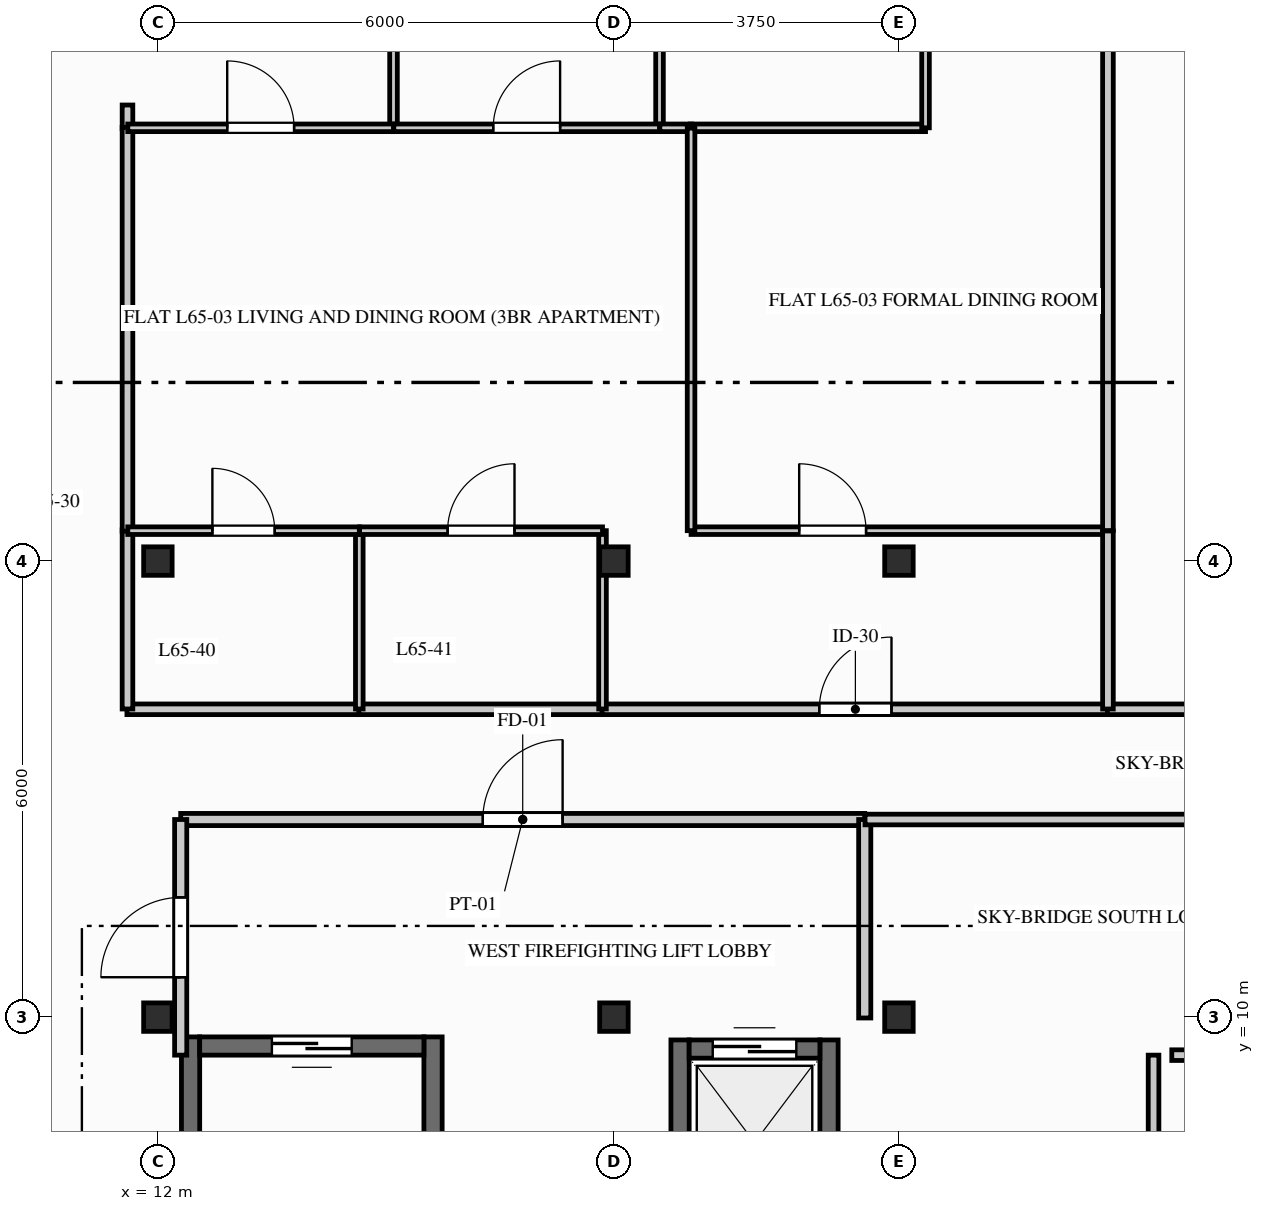
"""IFC4 building model, lengths in metres.
Left out: names, types, materials, properties, quantities, classifications, styles, units other than length and angle.
Written with IfcOpenShell. Run it as: python <this file> out.ifc"""

import sys

from ifc_helpers import new_model, si_unit, direction, frame, frame_2d, origin, origin_2d, place, context, subcontext, project, spatial, rectangle, i_section, extrude, element, fill, save


model = new_model("IFC4")
c1 = context("Model", 3, precision=1e-05, world=origin(), true_north=direction((0.0, 1.0)))
c2 = subcontext(c1, "Body", "Model", "MODEL_VIEW")
j1 = project(units=[si_unit("LENGTHUNIT", "METRE"), si_unit("PLANEANGLEUNIT", "RADIAN")], contexts=[c1])
p1 = place(None, origin())
s1 = spatial("IfcSite", under=j1, at=p1, CompositionType="ELEMENT")
p2 = place(p1, origin())
s2 = spatial("IfcBuilding", under=s1, at=p2, CompositionType="ELEMENT")
p3 = place(p2, frame((0.0, 0.0, 214.4)))
s3 = spatial("IfcBuildingStorey", under=s2, at=p3, CompositionType="ELEMENT", Elevation=214.4)
for number, where, z_axis, x_axis in (
    (1, (12.0, 10.0, 0.0), (0.0, 0.0, 1.0), (1.0, 0.0, 0.0)),
    (2, (12.0, 16.0, 0.0), (0.0, 0.0, 1.0), (1.0, 0.0, 0.0)),
    (3, (18.0, 10.0, 0.0), (0.0, 0.0, 1.0), (1.0, 0.0, 0.0)),
    (4, (18.0, 16.0, 0.0), (0.0, 0.0, 1.0), (1.0, 0.0, 0.0)),
    (5, (21.75, 10.0, 0.0), (0.0, 0.0, 1.0), (1.0, 0.0, 0.0)),
    (6, (21.75, 16.0, 0.0), (0.0, 0.0, 1.0), (1.0, 0.0, 0.0)),
):
    element("IfcColumn", number, at=place(p3, frame(where, z_axis=z_axis, x_axis=x_axis)), inside=s3, PredefinedType="COLUMN", context=c2, shape_type="SweptSolid", body=[
        extrude(i_section(OverallWidth=0.375, OverallDepth=0.375, WebThickness=0.017, FlangeThickness=0.027, FilletRadius=0.015, at=origin_2d()), origin(), (0.0, 0.0, 1.0), 3.6),
    ])
for number, where, z_axis, x_axis in (
    (7, (12.43, 2.54, 0.0), (0.0, 0.0, 1.0), (0.0, 1.0, 0.0)),
    (8, (15.62, 2.54, 0.0), (0.0, 0.0, 1.0), (0.0, 1.0, 0.0)),
):
    element("IfcWall", number, at=place(p3, frame(where, z_axis=z_axis, x_axis=x_axis)), inside=s3, PredefinedType="SHEAR", context=c2, shape_type="SweptSolid", body=[
        extrude(rectangle(XDim=7.2, YDim=0.24, at=frame_2d((3.6, 0.0))), origin(), (0.0, 0.0, 1.0), 3.33),
    ])
p4 = place(p3, frame((15.5, 9.62, 0.0), z_axis=(0.0, 0.0, 1.0), x_axis=(-1.0, 0.0, 0.0)))
e9 = element("IfcWall", 9, at=p4, inside=s3, PredefinedType="SHEAR", context=c2, shape_type="SweptSolid", body=[
    extrude(rectangle(XDim=2.95, YDim=0.24, at=frame_2d((1.475, 0.0))), origin(), (0.0, 0.0, 1.0), 3.33),
])
p5 = place(p4, frame((0.95, 0.0, 0.0)))
e10 = element("IfcOpeningElement", 10, at=p5, cuts=e9, PredefinedType="OPENING", context=c2, shape_type="SweptSolid", body=[
    extrude(rectangle(XDim=1.05, YDim=2.06, at=frame_2d((0.525, 1.03))), frame((0.0, 0.13, 0.0), z_axis=(0.0, -1.0, 0.0), x_axis=(1.0, 0.0, 0.0)), (0.0, 0.0, 1.0), 0.26),
])
for number, where, z_axis, x_axis in (
    (11, (18.87, 7.0, 0.0), (0.0, 0.0, 1.0), (0.0, 1.0, 0.0)),
    (12, (20.83, 7.0, 0.0), (0.0, 0.0, 1.0), (0.0, 1.0, 0.0)),
):
    element("IfcWall", number, at=place(p3, frame(where, z_axis=z_axis, x_axis=x_axis)), inside=s3, PredefinedType="SHEAR", context=c2, shape_type="SweptSolid", body=[
        extrude(rectangle(XDim=2.7, YDim=0.24, at=frame_2d((1.35, 0.0))), origin(), (0.0, 0.0, 1.0), 3.33),
    ])
p6 = place(p3, frame((18.99, 9.58, 0.0), z_axis=(0.0, 0.0, 1.0), x_axis=(1.0, 0.0, 0.0)))
e13 = element("IfcWall", 13, at=p6, inside=s3, PredefinedType="SHEAR", context=c2, shape_type="SweptSolid", body=[
    extrude(rectangle(XDim=1.72, YDim=0.24, at=frame_2d((0.86, 0.0))), origin(), (0.0, 0.0, 1.0), 3.33),
])
p7 = place(p6, frame((0.31, 0.0, 0.0)))
e14 = element("IfcOpeningElement", 14, at=p7, cuts=e13, PredefinedType="OPENING", context=c2, shape_type="SweptSolid", body=[
    extrude(rectangle(XDim=1.1, YDim=2.06, at=frame_2d((0.55, 1.03))), frame((0.0, 0.13, 0.0), z_axis=(0.0, -1.0, 0.0), x_axis=(1.0, 0.0, 0.0)), (0.0, 0.0, 1.0), 0.26),
])
p8 = place(p3, frame((25.1, 2.154, 0.0), z_axis=(0.0, 0.0, 1.0), x_axis=(0.0, 1.0, 0.0)))
e15 = element("IfcWall", 15, at=p8, inside=s3, PredefinedType="PARTITIONING", context=c2, shape_type="SweptSolid", body=[
    extrude(rectangle(XDim=7.346, YDim=0.14, at=frame_2d((3.673, 0.0))), origin(), (0.0, 0.0, 1.0), 3.33),
])
p9 = place(p3, frame((12.3, 12.6, 0.0), z_axis=(0.0, 0.0, 1.0), x_axis=(1.0, 0.0, 0.0)))
e16 = element("IfcWall", 16, at=p9, inside=s3, PredefinedType="PARTITIONING", context=c2, shape_type="SweptSolid", body=[
    extrude(rectangle(XDim=9.0, YDim=0.16, at=frame_2d((4.5, 0.0))), origin(), (0.0, 0.0, 1.0), 2.685),
])
p10 = place(p9, frame((3.975, 0.0, 0.0)))
e17 = element("IfcOpeningElement", 17, at=p10, cuts=e16, PredefinedType="OPENING", context=c2, shape_type="SweptSolid", body=[
    extrude(rectangle(XDim=1.05, YDim=2.06, at=frame_2d((0.525, 1.03))), frame((0.0, 0.09, 0.0), z_axis=(0.0, -1.0, 0.0), x_axis=(1.0, 0.0, 0.0)), (0.0, 0.0, 1.0), 0.18),
])
p11 = place(p3, frame((12.3, 9.5, 0.0), z_axis=(0.0, 0.0, 1.0), x_axis=(0.0, 1.0, 0.0)))
e18 = element("IfcWall", 18, at=p11, inside=s3, PredefinedType="PARTITIONING", context=c2, shape_type="SweptSolid", body=[
    extrude(rectangle(XDim=3.1, YDim=0.16, at=frame_2d((1.55, 0.0))), origin(), (0.0, 0.0, 1.0), 2.685),
])
p12 = place(p11, frame((1.025, 0.0, 0.0)))
e19 = element("IfcOpeningElement", 19, at=p12, cuts=e18, PredefinedType="OPENING", context=c2, shape_type="SweptSolid", body=[
    extrude(rectangle(XDim=1.05, YDim=2.06, at=frame_2d((0.525, 1.03))), frame((0.0, 0.09, 0.0), z_axis=(0.0, -1.0, 0.0), x_axis=(1.0, 0.0, 0.0)), (0.0, 0.0, 1.0), 0.18),
])
p13 = place(p3, frame((21.3, 9.989, 0.0), z_axis=(0.0, 0.0, 1.0), x_axis=(0.0, 1.0, 0.0)))
e20 = element("IfcWall", 20, at=p13, inside=s3, PredefinedType="PARTITIONING", context=c2, shape_type="SweptSolid", body=[
    extrude(rectangle(XDim=2.611, YDim=0.16, at=frame_2d((1.306, 0.0))), origin(), (0.0, 0.0, 1.0), 2.685),
])
p14 = place(p3, frame((21.304, 12.6, 0.0), z_axis=(0.0, 0.0, 1.0), x_axis=(1.0, 0.0, 0.0)))
e21 = element("IfcWall", 21, at=p14, inside=s3, PredefinedType="PARTITIONING", context=c2, shape_type="SweptSolid", body=[
    extrude(rectangle(XDim=7.892, YDim=0.14, at=frame_2d((3.946, 0.0))), origin(), (0.0, 0.0, 1.0), 2.685),
])
p15 = place(p3, frame((11.593, 14.05, 0.0), z_axis=(0.0, 0.0, 1.0), x_axis=(1.0, 0.0, 0.0)))
e22 = element("IfcWall", 22, at=p15, inside=s3, PredefinedType="PARTITIONING", context=c2, shape_type="SweptSolid", body=[
    extrude(rectangle(XDim=3.069, YDim=0.14, at=frame_2d((1.534, 0.0))), origin(), (0.0, 0.0, 1.0), 2.685),
])
p16 = place(p3, frame((14.643, 14.05, 0.0), z_axis=(0.0, 0.0, 1.0), x_axis=(1.0, 0.0, 0.0)))
e23 = element("IfcWall", 23, at=p16, inside=s3, PredefinedType="PARTITIONING", context=c2, shape_type="SweptSolid", body=[
    extrude(rectangle(XDim=3.219, YDim=0.14, at=frame_2d((1.609, 0.0))), origin(), (0.0, 0.0, 1.0), 2.685),
])
p17 = place(p3, frame((17.843, 14.05, 0.0), z_axis=(0.0, 0.0, 1.0), x_axis=(1.0, 0.0, 0.0)))
e24 = element("IfcWall", 24, at=p17, inside=s3, PredefinedType="PARTITIONING", context=c2, shape_type="SweptSolid", body=[
    extrude(rectangle(XDim=6.668, YDim=0.14, at=frame_2d((3.334, 0.0))), origin(), (0.0, 0.0, 1.0), 2.685),
])
p18 = place(p17, frame((2.859, 0.0, 0.0)))
e25 = element("IfcOpeningElement", 25, at=p18, cuts=e24, PredefinedType="OPENING", context=c2, shape_type="SweptSolid", body=[
    extrude(rectangle(XDim=0.95, YDim=2.05, at=frame_2d((0.475, 1.025))), frame((0.0, 0.08, 0.0), z_axis=(0.0, -1.0, 0.0), x_axis=(1.0, 0.0, 0.0)), (0.0, 0.0, 1.0), 0.16),
])
p19 = place(p3, frame((24.493, 14.05, 0.0), z_axis=(0.0, 0.0, 1.0), x_axis=(1.0, 0.0, 0.0)))
e26 = element("IfcWall", 26, at=p19, inside=s3, PredefinedType="PARTITIONING", context=c2, shape_type="SweptSolid", body=[
    extrude(rectangle(XDim=11.019, YDim=0.14, at=frame_2d((5.509, 0.0))), origin(), (0.0, 0.0, 1.0), 2.685),
])
p20 = place(p19, frame((4.984, 0.0, 0.0)))
e27 = element("IfcOpeningElement", 27, at=p20, cuts=e26, PredefinedType="OPENING", context=c2, shape_type="SweptSolid", body=[
    extrude(rectangle(XDim=1.05, YDim=2.06, at=frame_2d((0.525, 1.03))), frame((0.0, 0.08, 0.0), z_axis=(0.0, -1.0, 0.0), x_axis=(1.0, 0.0, 0.0)), (0.0, 0.0, 1.0), 0.16),
])
p21 = place(p3, frame((11.6, 14.054, 0.0), z_axis=(0.0, 0.0, 1.0), x_axis=(0.0, 1.0, 0.0)))
e28 = element("IfcWall", 28, at=p21, inside=s3, PredefinedType="PARTITIONING", context=c2, shape_type="SweptSolid", body=[
    extrude(rectangle(XDim=2.357, YDim=0.14, at=frame_2d((1.179, 0.0))), origin(), (0.0, 0.0, 1.0), 2.685),
])
p22 = place(p3, frame((11.6, 21.689, 0.0), z_axis=(0.0, 0.0, 1.0), x_axis=(0.0, 1.0, 0.0)))
e29 = element("IfcWall", 29, at=p22, inside=s3, PredefinedType="PARTITIONING", context=c2, shape_type="SweptSolid", body=[
    extrude(rectangle(XDim=0.311, YDim=0.14, at=frame_2d((0.156, 0.0))), origin(), (0.0, 0.0, 1.0), 3.33),
])
p23 = place(p3, frame((11.6, 16.393, 0.0), z_axis=(0.0, 0.0, 1.0), x_axis=(0.0, 1.0, 0.0)))
e30 = element("IfcWall", 30, at=p23, inside=s3, PredefinedType="PARTITIONING", context=c2, shape_type="SweptSolid", body=[
    extrude(rectangle(XDim=5.315, YDim=0.14, at=frame_2d((2.657, 0.0))), origin(), (0.0, 0.0, 1.0), 2.899),
])
p24 = place(p3, frame((14.65, 14.054, 0.0), z_axis=(0.0, 0.0, 1.0), x_axis=(0.0, 1.0, 0.0)))
e31 = element("IfcWall", 31, at=p24, inside=s3, PredefinedType="PARTITIONING", context=c2, shape_type="SweptSolid", body=[
    extrude(rectangle(XDim=2.346, YDim=0.1, at=frame_2d((1.173, 0.0))), origin(), (0.0, 0.0, 1.0), 2.685),
])
p25 = place(p3, frame((11.604, 16.4, 0.0), z_axis=(0.0, 0.0, 1.0), x_axis=(1.0, 0.0, 0.0)))
e32 = element("IfcWall", 32, at=p25, inside=s3, PredefinedType="PARTITIONING", context=c2, shape_type="SweptSolid", body=[
    extrude(rectangle(XDim=3.046, YDim=0.1, at=frame_2d((1.523, 0.0))), origin(), (0.0, 0.0, 1.0), 2.685),
])
p26 = place(p25, frame((1.113, 0.0, 0.0)))
e33 = element("IfcOpeningElement", 33, at=p26, cuts=e32, PredefinedType="OPENING", context=c2, shape_type="SweptSolid", body=[
    extrude(rectangle(XDim=0.82, YDim=2.02, at=frame_2d((0.41, 1.01))), frame((0.0, 0.06, 0.0), z_axis=(0.0, -1.0, 0.0), x_axis=(1.0, 0.0, 0.0)), (0.0, 0.0, 1.0), 0.12),
])
p27 = place(p3, frame((17.85, 14.054, 0.0), z_axis=(0.0, 0.0, 1.0), x_axis=(0.0, 1.0, 0.0)))
e34 = element("IfcWall", 34, at=p27, inside=s3, PredefinedType="PARTITIONING", context=c2, shape_type="SweptSolid", body=[
    extrude(rectangle(XDim=2.346, YDim=0.1, at=frame_2d((1.173, 0.0))), origin(), (0.0, 0.0, 1.0), 2.685),
])
p28 = place(p3, frame((14.654, 16.4, 0.0), z_axis=(0.0, 0.0, 1.0), x_axis=(1.0, 0.0, 0.0)))
e35 = element("IfcWall", 35, at=p28, inside=s3, PredefinedType="PARTITIONING", context=c2, shape_type="SweptSolid", body=[
    extrude(rectangle(XDim=3.196, YDim=0.1, at=frame_2d((1.598, 0.0))), origin(), (0.0, 0.0, 1.0), 2.685),
])
p29 = place(p28, frame((1.158, 0.0, 0.0)))
e36 = element("IfcOpeningElement", 36, at=p29, cuts=e35, PredefinedType="OPENING", context=c2, shape_type="SweptSolid", body=[
    extrude(rectangle(XDim=0.88, YDim=2.04, at=frame_2d((0.44, 1.02))), frame((0.0, 0.06, 0.0), z_axis=(0.0, -1.0, 0.0), x_axis=(1.0, 0.0, 0.0)), (0.0, 0.0, 1.0), 0.12),
])
p30 = place(p3, frame((15.1, 21.7, 0.0), z_axis=(0.0, 0.0, 1.0), x_axis=(0.0, 1.0, 0.0)))
e37 = element("IfcWall", 37, at=p30, inside=s3, PredefinedType="PARTITIONING", context=c2, shape_type="SweptSolid", body=[
    extrude(rectangle(XDim=4.6, YDim=0.1, at=frame_2d((2.3, 0.0))), origin(), (0.0, 0.0, 1.0), 2.685),
])
p31 = place(p3, frame((11.604, 21.7, 0.0), z_axis=(0.0, 0.0, 1.0), x_axis=(1.0, 0.0, 0.0)))
e38 = element("IfcWall", 38, at=p31, inside=s3, PredefinedType="PARTITIONING", context=c2, shape_type="SweptSolid", body=[
    extrude(rectangle(XDim=3.496, YDim=0.1, at=frame_2d((1.748, 0.0))), origin(), (0.0, 0.0, 1.0), 2.685),
])
p32 = place(p31, frame((1.308, 0.0, 0.0)))
e39 = element("IfcOpeningElement", 39, at=p32, cuts=e38, PredefinedType="OPENING", context=c2, shape_type="SweptSolid", body=[
    extrude(rectangle(XDim=0.88, YDim=2.04, at=frame_2d((0.44, 1.02))), frame((0.0, 0.06, 0.0), z_axis=(0.0, -1.0, 0.0), x_axis=(1.0, 0.0, 0.0)), (0.0, 0.0, 1.0), 0.12),
])
p33 = place(p3, frame((18.6, 21.7, 0.0), z_axis=(0.0, 0.0, 1.0), x_axis=(0.0, 1.0, 0.0)))
e40 = element("IfcWall", 40, at=p33, inside=s3, PredefinedType="PARTITIONING", context=c2, shape_type="SweptSolid", body=[
    extrude(rectangle(XDim=4.6, YDim=0.1, at=frame_2d((2.3, 0.0))), origin(), (0.0, 0.0, 1.0), 2.685),
])
p34 = place(p33, frame((2.33, 0.0, 0.0)))
e41 = element("IfcOpeningElement", 41, at=p34, cuts=e40, PredefinedType="OPENING", context=c2, shape_type="SweptSolid", body=[
    extrude(rectangle(XDim=0.82, YDim=2.02, at=frame_2d((0.41, 1.01))), frame((0.0, 0.06, 0.0), z_axis=(0.0, -1.0, 0.0), x_axis=(1.0, 0.0, 0.0)), (0.0, 0.0, 1.0), 0.12),
])
p35 = place(p3, frame((15.104, 21.7, 0.0), z_axis=(0.0, 0.0, 1.0), x_axis=(1.0, 0.0, 0.0)))
e42 = element("IfcWall", 42, at=p35, inside=s3, PredefinedType="PARTITIONING", context=c2, shape_type="SweptSolid", body=[
    extrude(rectangle(XDim=3.496, YDim=0.1, at=frame_2d((1.748, 0.0))), origin(), (0.0, 0.0, 1.0), 2.685),
])
p36 = place(p35, frame((1.308, 0.0, 0.0)))
e43 = element("IfcOpeningElement", 43, at=p36, cuts=e42, PredefinedType="OPENING", context=c2, shape_type="SweptSolid", body=[
    extrude(rectangle(XDim=0.88, YDim=2.04, at=frame_2d((0.44, 1.02))), frame((0.0, 0.06, 0.0), z_axis=(0.0, -1.0, 0.0), x_axis=(1.0, 0.0, 0.0)), (0.0, 0.0, 1.0), 0.12),
])
p37 = place(p3, frame((19.004, 21.7, 0.0), z_axis=(0.0, 0.0, 1.0), x_axis=(1.0, 0.0, 0.0)))
e44 = element("IfcWall", 44, at=p37, inside=s3, PredefinedType="PARTITIONING", context=c2, shape_type="SweptSolid", body=[
    extrude(rectangle(XDim=3.096, YDim=0.1, at=frame_2d((1.548, 0.0))), origin(), (0.0, 0.0, 1.0), 2.685),
])
p38 = place(p3, frame((22.1, 21.7, 0.0), z_axis=(0.0, 0.0, 1.0), x_axis=(0.0, 1.0, 0.0)))
e45 = element("IfcWall", 45, at=p38, inside=s3, PredefinedType="PARTITIONING", context=c2, shape_type="SweptSolid", body=[
    extrude(rectangle(XDim=4.6, YDim=0.1, at=frame_2d((2.3, 0.0))), origin(), (0.0, 0.0, 1.0), 2.454),
])
p39 = place(p3, frame((18.604, 21.7, 0.0), z_axis=(0.0, 0.0, 1.0), x_axis=(1.0, 0.0, 0.0)))
e46 = element("IfcWall", 46, at=p39, inside=s3, PredefinedType="PARTITIONING", context=c2, shape_type="SweptSolid", body=[
    extrude(rectangle(XDim=0.418, YDim=0.1, at=frame_2d((0.209, 0.0))), origin(), (0.0, 0.0, 1.0), 3.33),
])
p40 = place(p3, frame((19.015, 16.4, 0.0), z_axis=(0.0, 0.0, 1.0), x_axis=(1.0, 0.0, 0.0)))
e47 = element("IfcWall", 47, at=p40, inside=s3, PredefinedType="PARTITIONING", context=c2, shape_type="SweptSolid", body=[
    extrude(rectangle(XDim=5.485, YDim=0.1, at=frame_2d((2.743, 0.0))), origin(), (0.0, 0.0, 1.0), 2.685),
])
p41 = place(p40, frame((1.423, 0.0, 0.0)))
e48 = element("IfcOpeningElement", 48, at=p41, cuts=e47, PredefinedType="OPENING", context=c2, shape_type="SweptSolid", body=[
    extrude(rectangle(XDim=0.88, YDim=2.04, at=frame_2d((0.44, 1.02))), frame((0.0, 0.06, 0.0), z_axis=(0.0, -1.0, 0.0), x_axis=(1.0, 0.0, 0.0)), (0.0, 0.0, 1.0), 0.12),
])
p42 = place(p3, frame((19.015, 16.4, 0.0), z_axis=(0.0, 0.0, 1.0), x_axis=(0.0, 1.0, 0.0)))
e49 = element("IfcWall", 49, at=p42, inside=s3, PredefinedType="PARTITIONING", context=c2, shape_type="SweptSolid", body=[
    extrude(rectangle(XDim=5.296, YDim=0.1, at=frame_2d((2.648, 0.0))), origin(), (0.0, 0.0, 1.0), 2.899),
])
p43 = place(p3, frame((24.5, 16.4, 0.0), z_axis=(0.0, 0.0, 1.0), x_axis=(0.0, 1.0, 0.0)))
e50 = element("IfcWall", 50, at=p43, inside=s3, PredefinedType="PARTITIONING", context=c2, shape_type="SweptSolid", body=[
    extrude(rectangle(XDim=7.111, YDim=0.14, at=frame_2d((3.556, 0.0))), origin(), (0.0, 0.0, 1.0), 2.454),
])
p44 = place(p3, frame((24.5, 14.054, 0.0), z_axis=(0.0, 0.0, 1.0), x_axis=(0.0, 1.0, 0.0)))
e51 = element("IfcWall", 51, at=p44, inside=s3, PredefinedType="PARTITIONING", context=c2, shape_type="SweptSolid", body=[
    extrude(rectangle(XDim=2.342, YDim=0.14, at=frame_2d((1.171, 0.0))), origin(), (0.0, 0.0, 1.0), 2.454),
])
p45 = place(p3, frame((25.34, 9.5, 0.0), z_axis=(0.0, 0.0, 1.0), x_axis=(1.0, 0.0, 0.0)))
e52 = element("IfcWall", 52, at=p45, inside=s3, PredefinedType="PARTITIONING", context=c2, shape_type="SweptSolid", body=[
    extrude(rectangle(XDim=1.32, YDim=0.14, at=frame_2d((0.66, 0.0))), origin(), (0.0, 0.0, 1.0), 3.33),
])
p46 = place(p5, origin())
e53 = element("IfcDoor", 53, at=p46, inside=s3, OperationType="SINGLE_SWING_LEFT", PredefinedType="DOOR", context=c2, shape_type="SweptSolid", body=[
    extrude(rectangle(XDim=1.05, YDim=2.06, at=frame_2d((0.525, 1.03))), frame((0.0, 0.025, 0.0), z_axis=(0.0, -1.0, 0.0), x_axis=(1.0, 0.0, 0.0)), (0.0, 0.0, 1.0), 0.05),
])
fill(e10, e53)
p47 = place(p7, origin())
e54 = element("IfcDoor", 54, at=p47, inside=s3, OperationType="SLIDING_TO_LEFT", PredefinedType="DOOR", context=c2, shape_type="SweptSolid", body=[
    extrude(rectangle(XDim=1.1, YDim=2.06, at=frame_2d((0.55, 1.03))), frame((0.0, 0.025, 0.0), z_axis=(0.0, -1.0, 0.0), x_axis=(1.0, 0.0, 0.0)), (0.0, 0.0, 1.0), 0.05),
])
fill(e14, e54)
p48 = place(p10, origin())
e55 = element("IfcDoor", 55, at=p48, inside=s3, OperationType="SINGLE_SWING_RIGHT", PredefinedType="DOOR", context=c2, shape_type="SweptSolid", body=[
    extrude(rectangle(XDim=1.05, YDim=2.06, at=frame_2d((0.525, 1.03))), frame((0.0, 0.025, 0.0), z_axis=(0.0, -1.0, 0.0), x_axis=(1.0, 0.0, 0.0)), (0.0, 0.0, 1.0), 0.05),
])
fill(e17, e55)
p49 = place(p12, origin())
e56 = element("IfcDoor", 56, at=p49, inside=s3, OperationType="SINGLE_SWING_LEFT", PredefinedType="DOOR", context=c2, shape_type="SweptSolid", body=[
    extrude(rectangle(XDim=1.05, YDim=2.06, at=frame_2d((0.525, 1.03))), frame((0.0, 0.025, 0.0), z_axis=(0.0, -1.0, 0.0), x_axis=(1.0, 0.0, 0.0)), (0.0, 0.0, 1.0), 0.05),
])
fill(e19, e56)
p50 = place(p18, origin())
e57 = element("IfcDoor", 57, at=p50, inside=s3, OperationType="SINGLE_SWING_RIGHT", PredefinedType="DOOR", context=c2, shape_type="SweptSolid", body=[
    extrude(rectangle(XDim=0.95, YDim=2.05, at=frame_2d((0.475, 1.025))), frame((0.0, 0.025, 0.0), z_axis=(0.0, -1.0, 0.0), x_axis=(1.0, 0.0, 0.0)), (0.0, 0.0, 1.0), 0.05),
])
fill(e25, e57)
p51 = place(p26, origin())
e58 = element("IfcDoor", 58, at=p51, inside=s3, OperationType="SINGLE_SWING_LEFT", PredefinedType="DOOR", context=c2, shape_type="SweptSolid", body=[
    extrude(rectangle(XDim=0.82, YDim=2.02, at=frame_2d((0.41, 1.01))), frame((0.0, 0.025, 0.0), z_axis=(0.0, -1.0, 0.0), x_axis=(1.0, 0.0, 0.0)), (0.0, 0.0, 1.0), 0.05),
])
fill(e33, e58)
p52 = place(p29, origin())
e59 = element("IfcDoor", 59, at=p52, inside=s3, OperationType="SINGLE_SWING_RIGHT", PredefinedType="DOOR", context=c2, shape_type="SweptSolid", body=[
    extrude(rectangle(XDim=0.88, YDim=2.04, at=frame_2d((0.44, 1.02))), frame((0.0, 0.025, 0.0), z_axis=(0.0, -1.0, 0.0), x_axis=(1.0, 0.0, 0.0)), (0.0, 0.0, 1.0), 0.05),
])
fill(e36, e59)
p53 = place(p32, origin())
e60 = element("IfcDoor", 60, at=p53, inside=s3, OperationType="SINGLE_SWING_LEFT", PredefinedType="DOOR", context=c2, shape_type="SweptSolid", body=[
    extrude(rectangle(XDim=0.88, YDim=2.04, at=frame_2d((0.44, 1.02))), frame((0.0, 0.025, 0.0), z_axis=(0.0, -1.0, 0.0), x_axis=(1.0, 0.0, 0.0)), (0.0, 0.0, 1.0), 0.05),
])
fill(e39, e60)
p54 = place(p36, origin())
e61 = element("IfcDoor", 61, at=p54, inside=s3, OperationType="SINGLE_SWING_RIGHT", PredefinedType="DOOR", context=c2, shape_type="SweptSolid", body=[
    extrude(rectangle(XDim=0.88, YDim=2.04, at=frame_2d((0.44, 1.02))), frame((0.0, 0.025, 0.0), z_axis=(0.0, -1.0, 0.0), x_axis=(1.0, 0.0, 0.0)), (0.0, 0.0, 1.0), 0.05),
])
fill(e43, e61)
p55 = place(p41, origin())
e62 = element("IfcDoor", 62, at=p55, inside=s3, OperationType="SINGLE_SWING_LEFT", PredefinedType="DOOR", context=c2, shape_type="SweptSolid", body=[
    extrude(rectangle(XDim=0.88, YDim=2.04, at=frame_2d((0.44, 1.02))), frame((0.0, 0.025, 0.0), z_axis=(0.0, -1.0, 0.0), x_axis=(1.0, 0.0, 0.0)), (0.0, 0.0, 1.0), 0.05),
])
fill(e48, e62)
save(model, sys.argv[1])
